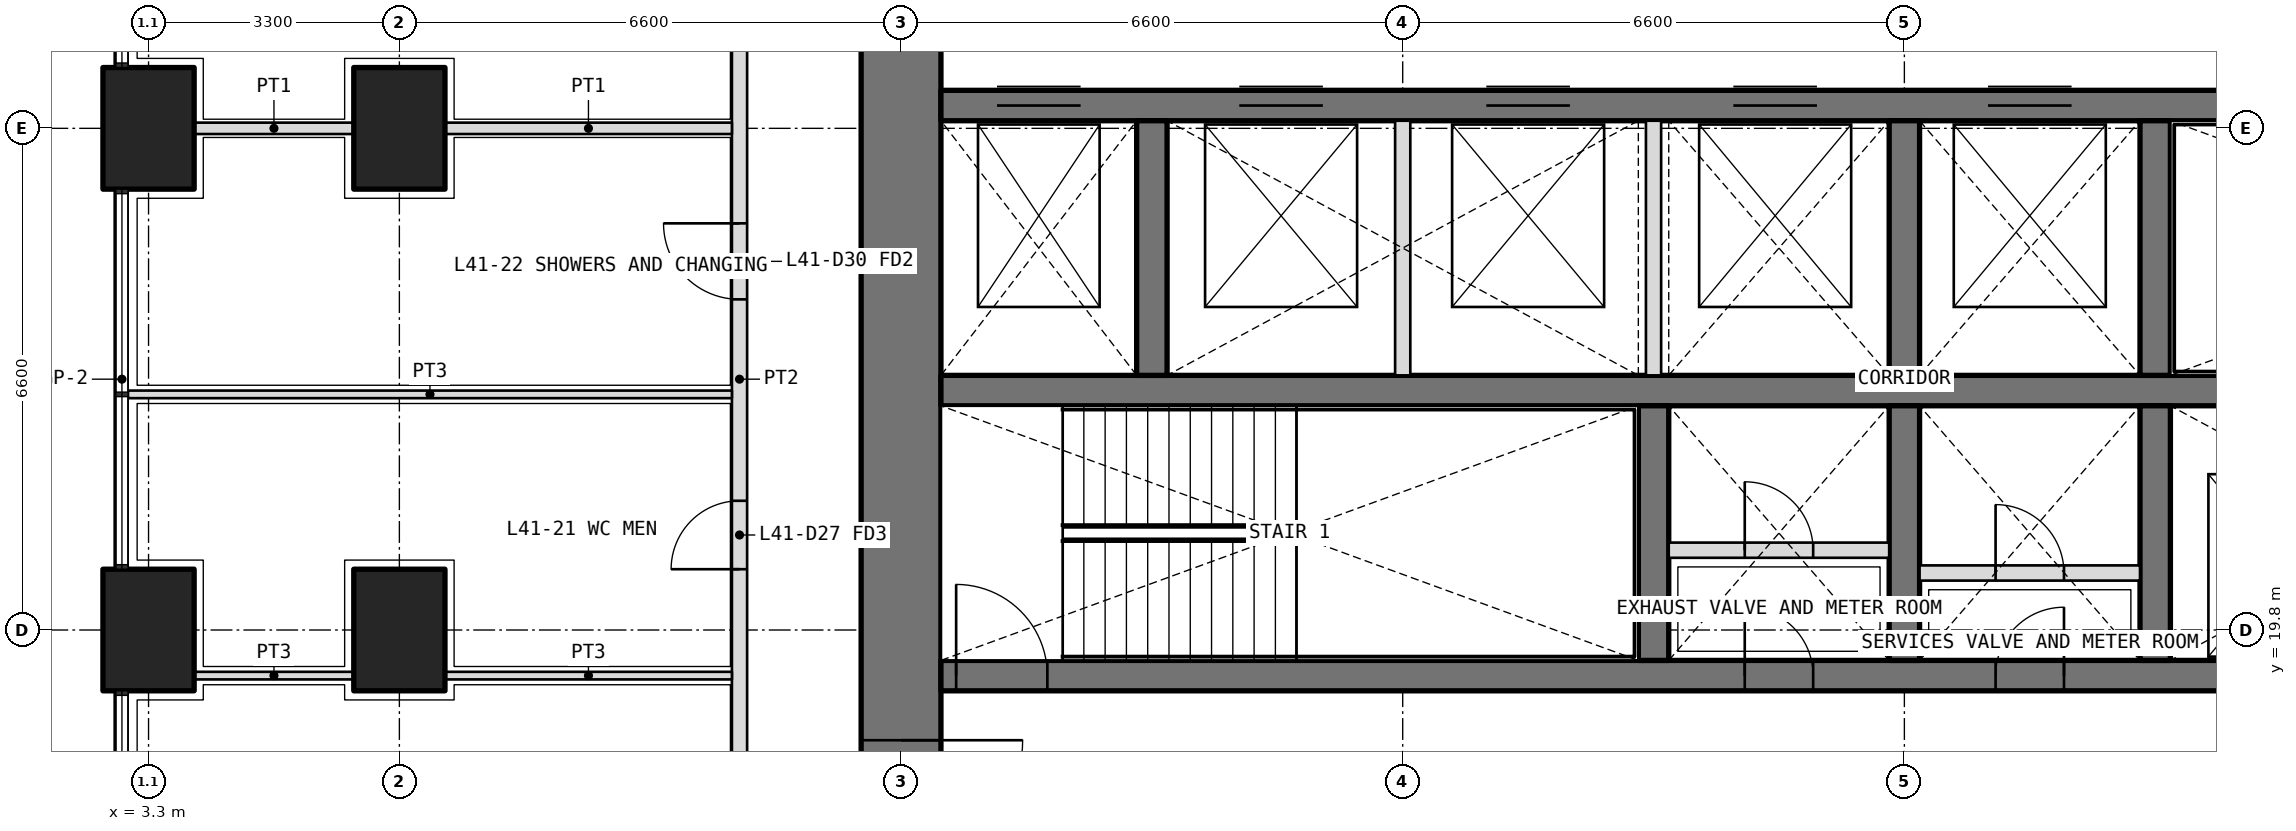
"""IFC4 building model, lengths in metres.
Left out: names, types, materials, properties, quantities, classifications, styles, units other than length and angle.
Written with IfcOpenShell. Run it as: python <this file> out.ifc"""

import sys

from ifc_helpers import new_model, si_unit, direction, frame, frame_2d, origin, origin_2d, place, context, subcontext, project, spatial, rectangle, extrude, element, fill, save


model = new_model("IFC4")
c1 = context("Model", 3, precision=1e-05, world=origin(), true_north=direction((0.0, 1.0)))
c2 = subcontext(c1, "Body", "Model", "MODEL_VIEW")
j1 = project(units=[si_unit("LENGTHUNIT", "METRE"), si_unit("PLANEANGLEUNIT", "RADIAN")], contexts=[c1])
p1 = place(None, origin())
s1 = spatial("IfcSite", under=j1, at=p1, CompositionType="ELEMENT")
p2 = place(p1, origin())
s2 = spatial("IfcBuilding", under=s1, at=p2, CompositionType="ELEMENT")
p3 = place(p2, frame((0.0, 0.0, 180.9)))
s3 = spatial("IfcBuildingStorey", under=s2, at=p3, CompositionType="ELEMENT", Elevation=180.9)
for number, where, z_axis, x_axis in (
    (1, (3.3, 19.8, 0.0), (0.0, 0.0, 1.0), (0.0, 1.0, 0.0)),
    (2, (3.3, 26.4, 0.0), (0.0, 0.0, 1.0), (0.0, 1.0, 0.0)),
    (3, (6.6, 19.8, 0.0), (0.0, 0.0, 1.0), (0.0, 1.0, 0.0)),
    (4, (6.6, 26.4, 0.0), (0.0, 0.0, 1.0), (0.0, 1.0, 0.0)),
):
    element("IfcColumn", number, at=place(p3, frame(where, z_axis=z_axis, x_axis=x_axis)), inside=s3, PredefinedType="COLUMN", context=c2, shape_type="SweptSolid", body=[
        extrude(rectangle(XDim=1.6, YDim=1.2, at=origin_2d()), origin(), (0.0, 0.0, 1.0), 4.2),
    ])
p4 = place(p3, frame((13.2, 32.475, 0.0), z_axis=(0.0, 0.0, 1.0), x_axis=(0.0, -1.0, 0.0)))
e5 = element("IfcWall", 5, at=p4, inside=s3, PredefinedType="SHEAR", context=c2, shape_type="SweptSolid", body=[
    extrude(rectangle(XDim=18.75, YDim=1.05, at=frame_2d((9.375, 0.0))), origin(), (0.0, 0.0, 1.0), 4.2),
])
p5 = place(p4, frame((14.125, 0.0, 0.0)))
e6 = element("IfcOpeningElement", 6, at=p5, cuts=e5, PredefinedType="OPENING", context=c2, shape_type="SweptSolid", body=[
    extrude(rectangle(XDim=1.6, YDim=2.1, at=frame_2d((0.8, 1.05))), frame((0.0, 0.535, 0.0), z_axis=(0.0, -1.0, 0.0), x_axis=(1.0, 0.0, 0.0)), (0.0, 0.0, 1.0), 1.07),
])
p6 = place(p4, frame((3.325, 0.0, 0.0)))
e7 = element("IfcOpeningElement", 7, at=p6, cuts=e5, PredefinedType="OPENING", context=c2, shape_type="SweptSolid", body=[
    extrude(rectangle(XDim=1.6, YDim=2.1, at=frame_2d((0.8, 1.05))), frame((0.0, 0.535, 0.0), z_axis=(0.0, -1.0, 0.0), x_axis=(1.0, 0.0, 0.0)), (0.0, 0.0, 1.0), 1.07),
])
p7 = place(p3, frame((13.725, 19.2, 0.0), z_axis=(0.0, 0.0, 1.0), x_axis=(1.0, 0.0, 0.0)))
e8 = element("IfcWall", 8, at=p7, inside=s3, PredefinedType="SHEAR", context=c2, shape_type="SweptSolid", body=[
    extrude(rectangle(XDim=25.35, YDim=0.4, at=frame_2d((12.675, 0.0))), origin(), (0.0, 0.0, 1.0), 4.2),
])
p8 = place(p7, frame((10.575, 0.0, 0.0)))
e9 = element("IfcOpeningElement", 9, at=p8, cuts=e8, PredefinedType="OPENING", context=c2, shape_type="SweptSolid", body=[
    extrude(rectangle(XDim=0.9, YDim=2.1, at=frame_2d((0.45, 1.05))), frame((0.0, 0.21, 0.0), z_axis=(0.0, -1.0, 0.0), x_axis=(1.0, 0.0, 0.0)), (0.0, 0.0, 1.0), 0.42),
])
p9 = place(p7, frame((13.875, 0.0, 0.0)))
e10 = element("IfcOpeningElement", 10, at=p9, cuts=e8, PredefinedType="OPENING", context=c2, shape_type="SweptSolid", body=[
    extrude(rectangle(XDim=0.9, YDim=2.1, at=frame_2d((0.45, 1.05))), frame((0.0, 0.21, 0.0), z_axis=(0.0, -1.0, 0.0), x_axis=(1.0, 0.0, 0.0)), (0.0, 0.0, 1.0), 0.42),
])
p10 = place(p7, frame((0.2, 0.0, 0.0)))
e11 = element("IfcOpeningElement", 11, at=p10, cuts=e8, PredefinedType="OPENING", context=c2, shape_type="SweptSolid", body=[
    extrude(rectangle(XDim=1.2, YDim=2.1, at=frame_2d((0.6, 1.05))), frame((0.0, 0.21, 0.0), z_axis=(0.0, -1.0, 0.0), x_axis=(1.0, 0.0, 0.0)), (0.0, 0.0, 1.0), 0.42),
])
p11 = place(p7, frame((23.512, 0.0, 0.0)))
e12 = element("IfcOpeningElement", 12, at=p11, cuts=e8, PredefinedType="OPENING", context=c2, shape_type="SweptSolid", body=[
    extrude(rectangle(XDim=1.1, YDim=2.1, at=frame_2d((0.55, 1.05))), frame((0.0, 0.21, 0.0), z_axis=(0.0, -1.0, 0.0), x_axis=(1.0, 0.0, 0.0)), (0.0, 0.0, 1.0), 0.42),
])
p12 = place(p7, frame((17.125, 0.0, 0.0)))
e13 = element("IfcOpeningElement", 13, at=p12, cuts=e8, PredefinedType="OPENING", context=c2, shape_type="SweptSolid", body=[
    extrude(rectangle(XDim=1.1, YDim=2.1, at=frame_2d((0.55, 1.05))), frame((0.0, 0.21, 0.0), z_axis=(0.0, -1.0, 0.0), x_axis=(1.0, 0.0, 0.0)), (0.0, 0.0, 1.0), 0.42),
])
p13 = place(p7, frame((20.325, 0.0, 0.0)))
e14 = element("IfcOpeningElement", 14, at=p13, cuts=e8, PredefinedType="OPENING", context=c2, shape_type="SweptSolid", body=[
    extrude(rectangle(XDim=1.1, YDim=2.1, at=frame_2d((0.55, 1.05))), frame((0.0, 0.21, 0.0), z_axis=(0.0, -1.0, 0.0), x_axis=(1.0, 0.0, 0.0)), (0.0, 0.0, 1.0), 0.42),
])
p14 = place(p3, frame((13.725, 22.95, 0.0), z_axis=(0.0, 0.0, 1.0), x_axis=(1.0, 0.0, 0.0)))
e15 = element("IfcWall", 15, at=p14, inside=s3, PredefinedType="SHEAR", context=c2, shape_type="SweptSolid", body=[
    extrude(rectangle(XDim=25.35, YDim=0.4, at=frame_2d((12.675, 0.0))), origin(), (0.0, 0.0, 1.0), 4.2),
])
p15 = place(p3, frame((13.725, 26.7, 0.0), z_axis=(0.0, 0.0, 1.0), x_axis=(1.0, 0.0, 0.0)))
e16 = element("IfcWall", 16, at=p15, inside=s3, PredefinedType="SHEAR", context=c2, shape_type="SweptSolid", body=[
    extrude(rectangle(XDim=25.35, YDim=0.4, at=frame_2d((12.675, 0.0))), origin(), (0.0, 0.0, 1.0), 4.2),
])
p16 = place(p15, frame((23.95, 0.0, 0.0)))
e17 = element("IfcOpeningElement", 17, at=p16, cuts=e16, PredefinedType="OPENING", context=c2, shape_type="SweptSolid", body=[
    extrude(rectangle(XDim=1.2, YDim=2.1, at=frame_2d((0.6, 1.05))), frame((0.0, 0.21, 0.0), z_axis=(0.0, -1.0, 0.0), x_axis=(1.0, 0.0, 0.0)), (0.0, 0.0, 1.0), 0.42),
])
p17 = place(p15, frame((0.738, 0.0, 0.0)))
e18 = element("IfcOpeningElement", 18, at=p17, cuts=e16, PredefinedType="OPENING", context=c2, shape_type="SweptSolid", body=[
    extrude(rectangle(XDim=1.1, YDim=2.1, at=frame_2d((0.55, 1.05))), frame((0.0, 0.21, 0.0), z_axis=(0.0, -1.0, 0.0), x_axis=(1.0, 0.0, 0.0)), (0.0, 0.0, 1.0), 0.42),
])
p18 = place(p15, frame((3.925, 0.0, 0.0)))
e19 = element("IfcOpeningElement", 19, at=p18, cuts=e16, PredefinedType="OPENING", context=c2, shape_type="SweptSolid", body=[
    extrude(rectangle(XDim=1.1, YDim=2.1, at=frame_2d((0.55, 1.05))), frame((0.0, 0.21, 0.0), z_axis=(0.0, -1.0, 0.0), x_axis=(1.0, 0.0, 0.0)), (0.0, 0.0, 1.0), 0.42),
])
p19 = place(p15, frame((7.175, 0.0, 0.0)))
e20 = element("IfcOpeningElement", 20, at=p19, cuts=e16, PredefinedType="OPENING", context=c2, shape_type="SweptSolid", body=[
    extrude(rectangle(XDim=1.1, YDim=2.1, at=frame_2d((0.55, 1.05))), frame((0.0, 0.21, 0.0), z_axis=(0.0, -1.0, 0.0), x_axis=(1.0, 0.0, 0.0)), (0.0, 0.0, 1.0), 0.42),
])
p20 = place(p15, frame((10.425, 0.0, 0.0)))
e21 = element("IfcOpeningElement", 21, at=p20, cuts=e16, PredefinedType="OPENING", context=c2, shape_type="SweptSolid", body=[
    extrude(rectangle(XDim=1.1, YDim=2.1, at=frame_2d((0.55, 1.05))), frame((0.0, 0.21, 0.0), z_axis=(0.0, -1.0, 0.0), x_axis=(1.0, 0.0, 0.0)), (0.0, 0.0, 1.0), 0.42),
])
p21 = place(p15, frame((13.775, 0.0, 0.0)))
e22 = element("IfcOpeningElement", 22, at=p21, cuts=e16, PredefinedType="OPENING", context=c2, shape_type="SweptSolid", body=[
    extrude(rectangle(XDim=1.1, YDim=2.1, at=frame_2d((0.55, 1.05))), frame((0.0, 0.21, 0.0), z_axis=(0.0, -1.0, 0.0), x_axis=(1.0, 0.0, 0.0)), (0.0, 0.0, 1.0), 0.42),
])
for number, where, z_axis, x_axis in (
    (23, (23.1, 19.4, 0.0), (0.0, 0.0, 1.0), (0.0, 1.0, 0.0)),
    (24, (26.4, 19.4, 0.0), (0.0, 0.0, 1.0), (0.0, 1.0, 0.0)),
    (25, (29.7, 19.4, 0.0), (0.0, 0.0, 1.0), (0.0, 1.0, 0.0)),
    (26, (16.5, 23.15, 0.0), (0.0, 0.0, 1.0), (0.0, 1.0, 0.0)),
    (27, (26.4, 23.15, 0.0), (0.0, 0.0, 1.0), (0.0, 1.0, 0.0)),
    (28, (29.7, 23.15, 0.0), (0.0, 0.0, 1.0), (0.0, 1.0, 0.0)),
):
    element("IfcWall", number, at=place(p3, frame(where, z_axis=z_axis, x_axis=x_axis)), inside=s3, PredefinedType="SHEAR", context=c2, shape_type="SweptSolid", body=[
        extrude(rectangle(XDim=3.35, YDim=0.4, at=frame_2d((1.675, 0.0))), origin(), (0.0, 0.0, 1.0), 4.2),
    ])
for number, where, z_axis, x_axis in (
    (29, (19.8, 23.15, 0.0), (0.0, 0.0, 1.0), (0.0, 1.0, 0.0)),
    (30, (23.1, 23.15, 0.0), (0.0, 0.0, 1.0), (0.0, 1.0, 0.0)),
):
    element("IfcWall", number, at=place(p3, frame(where, z_axis=z_axis, x_axis=x_axis)), inside=s3, PredefinedType="PARTITIONING", context=c2, shape_type="SweptSolid", body=[
        extrude(rectangle(XDim=3.35, YDim=0.2, at=frame_2d((1.675, 0.0))), origin(), (0.0, 0.0, 1.0), 4.2),
    ])
p22 = place(p3, frame((11.075, 11.175, 0.0), z_axis=(0.0, 0.0, 1.0), x_axis=(0.0, 1.0, 0.0)))
e31 = element("IfcWall", 31, at=p22, inside=s3, PredefinedType="PARTITIONING", context=c2, shape_type="SweptSolid", body=[
    extrude(rectangle(XDim=23.85, YDim=0.2, at=frame_2d((11.925, 0.0))), origin(), (0.0, 0.0, 1.0), 2.85),
])
p23 = place(p22, frame((0.462, 0.0, 0.0)))
e32 = element("IfcOpeningElement", 32, at=p23, cuts=e31, PredefinedType="OPENING", context=c2, shape_type="SweptSolid", body=[
    extrude(rectangle(XDim=1.0, YDim=2.1, at=frame_2d((0.5, 1.05))), frame((0.0, 0.11, 0.0), z_axis=(0.0, -1.0, 0.0), x_axis=(1.0, 0.0, 0.0)), (0.0, 0.0, 1.0), 0.22),
])
p24 = place(p22, frame((2.575, 0.0, 0.0)))
e33 = element("IfcOpeningElement", 33, at=p24, cuts=e31, PredefinedType="OPENING", context=c2, shape_type="SweptSolid", body=[
    extrude(rectangle(XDim=1.0, YDim=2.1, at=frame_2d((0.5, 1.05))), frame((0.0, 0.11, 0.0), z_axis=(0.0, -1.0, 0.0), x_axis=(1.0, 0.0, 0.0)), (0.0, 0.0, 1.0), 0.22),
])
p25 = place(p22, frame((5.625, 0.0, 0.0)))
e34 = element("IfcOpeningElement", 34, at=p25, cuts=e31, PredefinedType="OPENING", context=c2, shape_type="SweptSolid", body=[
    extrude(rectangle(XDim=0.9, YDim=2.1, at=frame_2d((0.45, 1.05))), frame((0.0, 0.11, 0.0), z_axis=(0.0, -1.0, 0.0), x_axis=(1.0, 0.0, 0.0)), (0.0, 0.0, 1.0), 0.22),
])
p26 = place(p22, frame((9.425, 0.0, 0.0)))
e35 = element("IfcOpeningElement", 35, at=p26, cuts=e31, PredefinedType="OPENING", context=c2, shape_type="SweptSolid", body=[
    extrude(rectangle(XDim=0.9, YDim=2.1, at=frame_2d((0.45, 1.05))), frame((0.0, 0.11, 0.0), z_axis=(0.0, -1.0, 0.0), x_axis=(1.0, 0.0, 0.0)), (0.0, 0.0, 1.0), 0.22),
])
p27 = place(p22, frame((12.975, 0.0, 0.0)))
e36 = element("IfcOpeningElement", 36, at=p27, cuts=e31, PredefinedType="OPENING", context=c2, shape_type="SweptSolid", body=[
    extrude(rectangle(XDim=1.0, YDim=2.1, at=frame_2d((0.5, 1.05))), frame((0.0, 0.11, 0.0), z_axis=(0.0, -1.0, 0.0), x_axis=(1.0, 0.0, 0.0)), (0.0, 0.0, 1.0), 0.22),
])
p28 = place(p22, frame((19.087, 0.0, 0.0)))
e37 = element("IfcOpeningElement", 37, at=p28, cuts=e31, PredefinedType="OPENING", context=c2, shape_type="SweptSolid", body=[
    extrude(rectangle(XDim=1.0, YDim=2.1, at=frame_2d((0.5, 1.05))), frame((0.0, 0.11, 0.0), z_axis=(0.0, -1.0, 0.0), x_axis=(1.0, 0.0, 0.0)), (0.0, 0.0, 1.0), 0.22),
])
p29 = place(p3, frame((3.9, 19.2, 0.0), z_axis=(0.0, 0.0, 1.0), x_axis=(1.0, 0.0, 0.0)))
e38 = element("IfcWall", 38, at=p29, inside=s3, PredefinedType="PARTITIONING", context=c2, shape_type="SweptSolid", body=[
    extrude(rectangle(XDim=2.1, YDim=0.1, at=frame_2d((1.05, 0.0))), origin(), (0.0, 0.0, 1.0), 2.85),
])
p30 = place(p3, frame((7.2, 19.2, 0.0), z_axis=(0.0, 0.0, 1.0), x_axis=(1.0, 0.0, 0.0)))
e39 = element("IfcWall", 39, at=p30, inside=s3, PredefinedType="PARTITIONING", context=c2, shape_type="SweptSolid", body=[
    extrude(rectangle(XDim=3.775, YDim=0.1, at=frame_2d((1.888, 0.0))), origin(), (0.0, 0.0, 1.0), 2.85),
])
p31 = place(p3, frame((3.03, 22.9, 0.0), z_axis=(0.0, 0.0, 1.0), x_axis=(1.0, 0.0, 0.0)))
e40 = element("IfcWall", 40, at=p31, inside=s3, PredefinedType="PARTITIONING", context=c2, shape_type="SweptSolid", body=[
    extrude(rectangle(XDim=7.945, YDim=0.1, at=frame_2d((3.973, 0.0))), origin(), (0.0, 0.0, 1.0), 2.7),
])
p32 = place(p3, frame((3.9, 26.4, 0.0), z_axis=(0.0, 0.0, 1.0), x_axis=(1.0, 0.0, 0.0)))
e41 = element("IfcWall", 41, at=p32, inside=s3, PredefinedType="PARTITIONING", context=c2, shape_type="SweptSolid", body=[
    extrude(rectangle(XDim=2.1, YDim=0.15, at=frame_2d((1.05, 0.0))), origin(), (0.0, 0.0, 1.0), 2.85),
])
p33 = place(p3, frame((7.2, 26.4, 0.0), z_axis=(0.0, 0.0, 1.0), x_axis=(1.0, 0.0, 0.0)))
e42 = element("IfcWall", 42, at=p33, inside=s3, PredefinedType="PARTITIONING", context=c2, shape_type="SweptSolid", body=[
    extrude(rectangle(XDim=3.775, YDim=0.15, at=frame_2d((1.888, 0.0))), origin(), (0.0, 0.0, 1.0), 2.85),
])
p34 = place(p3, frame((23.3, 20.85, 0.0), z_axis=(0.0, 0.0, 1.0), x_axis=(1.0, 0.0, 0.0)))
e43 = element("IfcWall", 43, at=p34, inside=s3, PredefinedType="PARTITIONING", context=c2, shape_type="SweptSolid", body=[
    extrude(rectangle(XDim=2.9, YDim=0.2, at=frame_2d((1.45, 0.0))), origin(), (0.0, 0.0, 1.0), 3.9),
])
p35 = place(p34, frame((1.0, 0.0, 0.0)))
e44 = element("IfcOpeningElement", 44, at=p35, cuts=e43, PredefinedType="OPENING", context=c2, shape_type="SweptSolid", body=[
    extrude(rectangle(XDim=0.9, YDim=2.1, at=frame_2d((0.45, 1.05))), frame((0.0, 0.11, 0.0), z_axis=(0.0, -1.0, 0.0), x_axis=(1.0, 0.0, 0.0)), (0.0, 0.0, 1.0), 0.22),
])
p36 = place(p3, frame((26.6, 20.55, 0.0), z_axis=(0.0, 0.0, 1.0), x_axis=(1.0, 0.0, 0.0)))
e45 = element("IfcWall", 45, at=p36, inside=s3, PredefinedType="PARTITIONING", context=c2, shape_type="SweptSolid", body=[
    extrude(rectangle(XDim=2.9, YDim=0.2, at=frame_2d((1.45, 0.0))), origin(), (0.0, 0.0, 1.0), 3.9),
])
p37 = place(p36, frame((1.0, 0.0, 0.0)))
e46 = element("IfcOpeningElement", 46, at=p37, cuts=e45, PredefinedType="OPENING", context=c2, shape_type="SweptSolid", body=[
    extrude(rectangle(XDim=0.9, YDim=2.1, at=frame_2d((0.45, 1.05))), frame((0.0, 0.11, 0.0), z_axis=(0.0, -1.0, 0.0), x_axis=(1.0, 0.0, 0.0)), (0.0, 0.0, 1.0), 0.22),
])
p38 = place(p26, origin())
e47 = element("IfcDoor", 47, at=p38, inside=s3, OperationType="SINGLE_SWING_LEFT", PredefinedType="DOOR", context=c2, shape_type="SweptSolid", body=[
    extrude(rectangle(XDim=0.9, YDim=2.1, at=frame_2d((0.45, 1.05))), frame((0.0, 0.025, 0.0), z_axis=(0.0, -1.0, 0.0), x_axis=(1.0, 0.0, 0.0)), (0.0, 0.0, 1.0), 0.05),
])
fill(e35, e47)
p39 = place(p27, origin())
e48 = element("IfcDoor", 48, at=p39, inside=s3, OperationType="SINGLE_SWING_RIGHT", PredefinedType="DOOR", context=c2, shape_type="SweptSolid", body=[
    extrude(rectangle(XDim=1.0, YDim=2.1, at=frame_2d((0.5, 1.05))), frame((0.0, 0.025, 0.0), z_axis=(0.0, -1.0, 0.0), x_axis=(1.0, 0.0, 0.0)), (0.0, 0.0, 1.0), 0.05),
])
fill(e36, e48)
p40 = place(p8, origin())
e49 = element("IfcDoor", 49, at=p40, inside=s3, OperationType="SINGLE_SWING_LEFT", PredefinedType="DOOR", context=c2, shape_type="SweptSolid", body=[
    extrude(rectangle(XDim=0.9, YDim=2.1, at=frame_2d((0.45, 1.05))), frame((0.0, 0.025, 0.0), z_axis=(0.0, -1.0, 0.0), x_axis=(1.0, 0.0, 0.0)), (0.0, 0.0, 1.0), 0.05),
])
fill(e9, e49)
p41 = place(p35, origin())
e50 = element("IfcDoor", 50, at=p41, inside=s3, OperationType="SINGLE_SWING_LEFT", PredefinedType="DOOR", context=c2, shape_type="SweptSolid", body=[
    extrude(rectangle(XDim=0.9, YDim=2.1, at=frame_2d((0.45, 1.05))), frame((0.0, 0.025, 0.0), z_axis=(0.0, -1.0, 0.0), x_axis=(1.0, 0.0, 0.0)), (0.0, 0.0, 1.0), 0.05),
])
fill(e44, e50)
p42 = place(p9, origin())
e51 = element("IfcDoor", 51, at=p42, inside=s3, OperationType="SINGLE_SWING_RIGHT", PredefinedType="DOOR", context=c2, shape_type="SweptSolid", body=[
    extrude(rectangle(XDim=0.9, YDim=2.1, at=frame_2d((0.45, 1.05))), frame((0.0, 0.025, 0.0), z_axis=(0.0, -1.0, 0.0), x_axis=(1.0, 0.0, 0.0)), (0.0, 0.0, 1.0), 0.05),
])
fill(e10, e51)
p43 = place(p37, origin())
e52 = element("IfcDoor", 52, at=p43, inside=s3, OperationType="SINGLE_SWING_LEFT", PredefinedType="DOOR", context=c2, shape_type="SweptSolid", body=[
    extrude(rectangle(XDim=0.9, YDim=2.1, at=frame_2d((0.45, 1.05))), frame((0.0, 0.025, 0.0), z_axis=(0.0, -1.0, 0.0), x_axis=(1.0, 0.0, 0.0)), (0.0, 0.0, 1.0), 0.05),
])
fill(e46, e52)
p44 = place(p10, origin())
e53 = element("IfcDoor", 53, at=p44, inside=s3, OperationType="SINGLE_SWING_LEFT", PredefinedType="DOOR", context=c2, shape_type="SweptSolid", body=[
    extrude(rectangle(XDim=1.2, YDim=2.1, at=frame_2d((0.6, 1.05))), frame((0.0, 0.025, 0.0), z_axis=(0.0, -1.0, 0.0), x_axis=(1.0, 0.0, 0.0)), (0.0, 0.0, 1.0), 0.05),
])
fill(e11, e53)
p45 = place(p5, origin())
e54 = element("IfcDoor", 54, at=p45, inside=s3, OperationType="DOUBLE_DOOR_DOUBLE_SWING", PredefinedType="DOOR", context=c2, shape_type="SweptSolid", body=[
    extrude(rectangle(XDim=1.6, YDim=2.1, at=frame_2d((0.8, 1.05))), frame((0.0, 0.025, 0.0), z_axis=(0.0, -1.0, 0.0), x_axis=(1.0, 0.0, 0.0)), (0.0, 0.0, 1.0), 0.05),
])
fill(e6, e54)
p46 = place(p17, origin())
e55 = element("IfcDoor", 55, at=p46, inside=s3, OperationType="DOUBLE_DOOR_SLIDING", PredefinedType="DOOR", context=c2, shape_type="SweptSolid", body=[
    extrude(rectangle(XDim=1.1, YDim=2.1, at=frame_2d((0.55, 1.05))), frame((0.0, 0.025, 0.0), z_axis=(0.0, -1.0, 0.0), x_axis=(1.0, 0.0, 0.0)), (0.0, 0.0, 1.0), 0.05),
])
fill(e18, e55)
p47 = place(p18, origin())
e56 = element("IfcDoor", 56, at=p47, inside=s3, OperationType="DOUBLE_DOOR_SLIDING", PredefinedType="DOOR", context=c2, shape_type="SweptSolid", body=[
    extrude(rectangle(XDim=1.1, YDim=2.1, at=frame_2d((0.55, 1.05))), frame((0.0, 0.025, 0.0), z_axis=(0.0, -1.0, 0.0), x_axis=(1.0, 0.0, 0.0)), (0.0, 0.0, 1.0), 0.05),
])
fill(e19, e56)
p48 = place(p19, origin())
e57 = element("IfcDoor", 57, at=p48, inside=s3, OperationType="DOUBLE_DOOR_SLIDING", PredefinedType="DOOR", context=c2, shape_type="SweptSolid", body=[
    extrude(rectangle(XDim=1.1, YDim=2.1, at=frame_2d((0.55, 1.05))), frame((0.0, 0.025, 0.0), z_axis=(0.0, -1.0, 0.0), x_axis=(1.0, 0.0, 0.0)), (0.0, 0.0, 1.0), 0.05),
])
fill(e20, e57)
p49 = place(p20, origin())
e58 = element("IfcDoor", 58, at=p49, inside=s3, OperationType="DOUBLE_DOOR_SLIDING", PredefinedType="DOOR", context=c2, shape_type="SweptSolid", body=[
    extrude(rectangle(XDim=1.1, YDim=2.1, at=frame_2d((0.55, 1.05))), frame((0.0, 0.025, 0.0), z_axis=(0.0, -1.0, 0.0), x_axis=(1.0, 0.0, 0.0)), (0.0, 0.0, 1.0), 0.05),
])
fill(e21, e58)
p50 = place(p21, origin())
e59 = element("IfcDoor", 59, at=p50, inside=s3, OperationType="DOUBLE_DOOR_SLIDING", PredefinedType="DOOR", context=c2, shape_type="SweptSolid", body=[
    extrude(rectangle(XDim=1.1, YDim=2.1, at=frame_2d((0.55, 1.05))), frame((0.0, 0.025, 0.0), z_axis=(0.0, -1.0, 0.0), x_axis=(1.0, 0.0, 0.0)), (0.0, 0.0, 1.0), 0.05),
])
fill(e22, e59)
save(model, sys.argv[1])
